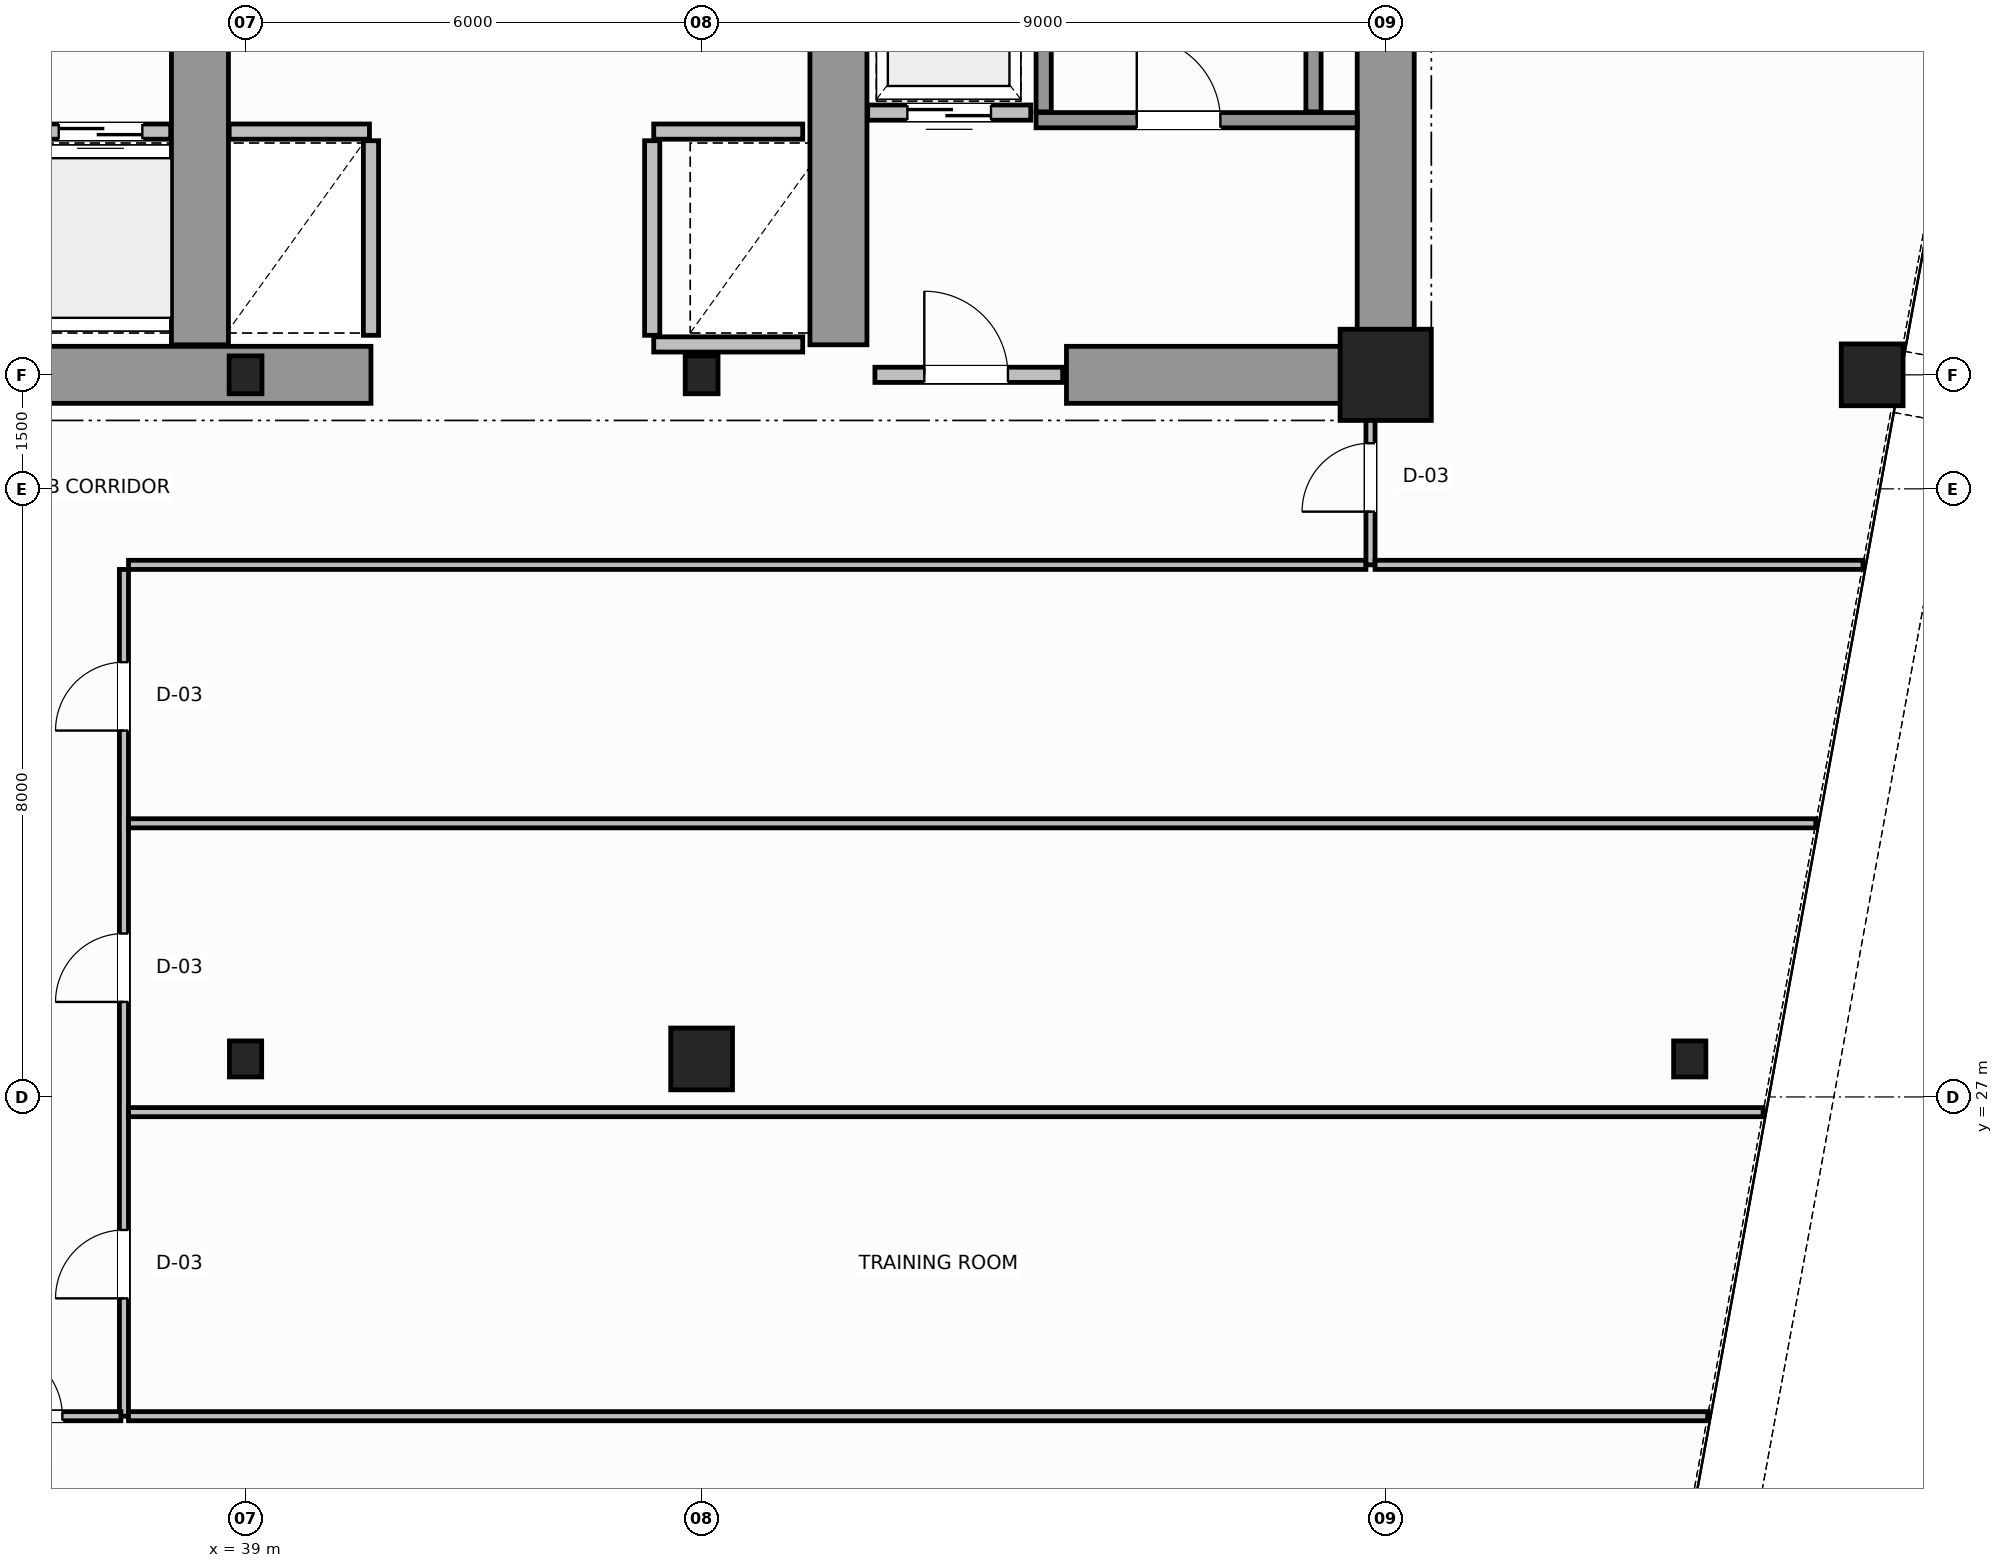
"""IFC4 building model, lengths in metres.
Left out: names, types, materials, properties, quantities, classifications, styles, units other than length and angle.
Written with IfcOpenShell. Run it as: python <this file> out.ifc"""

import sys

from ifc_helpers import new_model, si_unit, direction, frame, frame_2d, origin, origin_2d, place, context, subcontext, project, spatial, rectangle, hollow_circle, i_section, extrude, source, transform, mapped, element, fill, save


model = new_model("IFC4")
c1 = context("Model", 3, precision=1e-05, world=origin(), true_north=direction((0.0, 1.0)))
c2 = subcontext(c1, "Body", "Model", "MODEL_VIEW")
j1 = project(units=[si_unit("LENGTHUNIT", "METRE"), si_unit("PLANEANGLEUNIT", "RADIAN")], contexts=[c1])
p1 = place(None, origin())
s1 = spatial("IfcSite", under=j1, at=p1, CompositionType="ELEMENT")
p2 = place(p1, origin())
s2 = spatial("IfcBuilding", under=s1, at=p2, CompositionType="ELEMENT")
p3 = place(p2, frame((0.0, 0.0, 157.6)))
s3 = spatial("IfcBuildingStorey", under=s2, at=p3, CompositionType="ELEMENT", Elevation=157.6)
m1 = source(origin(), c2, "Body", "SweptSolid", [
    extrude(i_section(OverallWidth=0.432, OverallDepth=0.498, WebThickness=0.055, FlangeThickness=0.068, FilletRadius=0.015, at=origin_2d()), origin(), (0.0, 0.0, 1.0), 3.8),
])
for number, where, z_axis, x_axis in (
    (1, (39.0, 36.5, 0.0), (0.0, 0.0, 1.0), (1.0, 0.0, 0.0)),
    (2, (45.0, 36.5, 0.0), (0.0, 0.0, 1.0), (1.0, 0.0, 0.0)),
):
    element("IfcColumn", number, at=place(p3, frame(where, z_axis=z_axis, x_axis=x_axis)), inside=s3, PredefinedType="COLUMN", context=c2, shape_type="MappedRepresentation", body=[
        mapped(m1, transform((0.0, 0.0, 0.0), scale=1.0)),
    ])
m2 = source(origin(), c2, "Body", "SweptSolid", [
    extrude(rectangle(XDim=1.2, YDim=1.2, at=origin_2d()), origin(), (0.0, 0.0, 1.0), 3.8),
])
p4 = place(p3, frame((54.0, 36.5, 0.0), z_axis=(0.0, 0.0, 1.0), x_axis=(1.0, 0.0, 0.0)))
e3 = element("IfcColumn", 3, at=p4, inside=s3, PredefinedType="COLUMN", context=c2, shape_type="MappedRepresentation", body=[
    mapped(m2, transform((0.0, 0.0, 0.0), scale=1.0)),
])
m3 = source(origin(), c2, "Body", "SweptSolid", [
    extrude(hollow_circle(Radius=0.406, WallThickness=0.04, at=origin_2d()), origin(), (0.0, 0.0, 1.0), 3.8),
])
p5 = place(p3, frame((60.4, 36.5, 0.0), z_axis=(0.0, 0.0, 1.0), x_axis=(1.0, 0.0, 0.0)))
e4 = element("IfcColumn", 4, at=p5, inside=s3, PredefinedType="COLUMN", context=c2, shape_type="MappedRepresentation", body=[
    mapped(m3, transform((0.0, 0.0, 0.0), scale=1.0)),
])
m4 = source(origin(), c2, "Body", "SweptSolid", [
    extrude(i_section(OverallWidth=0.424, OverallDepth=0.474, WebThickness=0.047, FlangeThickness=0.065, FilletRadius=0.015, at=origin_2d()), origin(), (0.0, 0.0, 1.0), 3.8),
])
p6 = place(p3, frame((58.0, 27.5, 0.0), z_axis=(0.0, 0.0, 1.0), x_axis=(1.0, 0.0, 0.0)))
e5 = element("IfcColumn", 5, at=p6, inside=s3, PredefinedType="COLUMN", context=c2, shape_type="MappedRepresentation", body=[
    mapped(m4, transform((0.0, 0.0, 0.0), scale=1.0)),
])
m5 = source(origin(), c2, "Body", "SweptSolid", [
    extrude(i_section(OverallWidth=0.424, OverallDepth=0.474, WebThickness=0.047, FlangeThickness=0.065, FilletRadius=0.015, at=origin_2d()), origin(), (0.0, 0.0, 1.0), 3.8),
])
p7 = place(p3, frame((39.0, 27.5, 0.0), z_axis=(0.0, 0.0, 1.0), x_axis=(1.0, 0.0, 0.0)))
e6 = element("IfcColumn", 6, at=p7, inside=s3, PredefinedType="COLUMN", context=c2, shape_type="MappedRepresentation", body=[
    mapped(m5, transform((0.0, 0.0, 0.0), scale=1.0)),
])
p8 = place(p3, frame((45.0, 27.5, 0.0), z_axis=(0.0, 0.0, 1.0), x_axis=(1.0, 0.0, 0.0)))
e7 = element("IfcColumn", 7, at=p8, inside=s3, PredefinedType="COLUMN", context=c2, shape_type="MappedRepresentation", body=[
    mapped(m3, transform((0.0, 0.0, 0.0), scale=1.0)),
])
p9 = place(p3, frame((54.0, 36.5, 0.0), z_axis=(0.0, 0.0, 1.0), x_axis=(0.0, 1.0, 0.0)))
e8 = element("IfcWall", 8, at=p9, inside=s3, PredefinedType="SHEAR", context=c2, shape_type="SweptSolid", body=[
    extrude(rectangle(XDim=14.5, YDim=0.75, at=frame_2d((7.25, 0.0))), origin(), (0.0, 0.0, 1.0), 3.8),
])
p10 = place(p3, frame((36.15, 36.5, 0.0), z_axis=(0.0, 0.0, 1.0), x_axis=(1.0, 0.0, 0.0)))
e9 = element("IfcWall", 9, at=p10, inside=s3, PredefinedType="SHEAR", context=c2, shape_type="SweptSolid", body=[
    extrude(rectangle(XDim=4.5, YDim=0.75, at=frame_2d((2.25, 0.0))), origin(), (0.0, 0.0, 1.0), 3.8),
])
p11 = place(p3, frame((49.8, 36.5, 0.0), z_axis=(0.0, 0.0, 1.0), x_axis=(1.0, 0.0, 0.0)))
e10 = element("IfcWall", 10, at=p11, inside=s3, PredefinedType="SHEAR", context=c2, shape_type="SweptSolid", body=[
    extrude(rectangle(XDim=3.805, YDim=0.75, at=frame_2d((1.902, 0.0))), origin(), (0.0, 0.0, 1.0), 2.38),
])
for number, where, z_axis, x_axis in (
    (11, (38.4, 36.895, 0.0), (0.0, 0.0, 1.0), (0.0, 1.0, 0.0)),
    (12, (46.8, 36.895, 0.0), (0.0, 0.0, 1.0), (0.0, 1.0, 0.0)),
):
    element("IfcWall", number, at=place(p3, frame(where, z_axis=z_axis, x_axis=x_axis)), inside=s3, PredefinedType="SHEAR", context=c2, shape_type="SweptSolid", body=[
        extrude(rectangle(XDim=9.305, YDim=0.75, at=frame_2d((4.652, 0.0))), origin(), (0.0, 0.0, 1.0), 3.8),
    ])
p12 = place(p3, frame((49.4, 39.85, 0.0), z_axis=(0.0, 0.0, 1.0), x_axis=(1.0, 0.0, 0.0)))
e13 = element("IfcWall", 13, at=p12, inside=s3, PredefinedType="SOLIDWALL", context=c2, shape_type="SweptSolid", body=[
    extrude(rectangle(XDim=4.225, YDim=0.2, at=frame_2d((2.113, 0.0))), origin(), (0.0, 0.0, 1.0), 3.8),
])
p13 = place(p12, frame((1.325, 0.0, 0.0)))
e14 = element("IfcOpeningElement", 14, at=p13, cuts=e13, PredefinedType="OPENING", context=c2, shape_type="SweptSolid", body=[
    extrude(rectangle(XDim=1.1, YDim=2.15, at=frame_2d((0.55, 1.075))), frame((0.0, 0.11, 0.0), z_axis=(0.0, -1.0, 0.0), x_axis=(1.0, 0.0, 0.0)), (0.0, 0.0, 1.0), 0.22),
])
for number, where, z_axis, x_axis in (
    (15, (49.5, 39.96, 0.0), (0.0, 0.0, 1.0), (0.0, 1.0, 0.0)),
    (16, (53.05, 39.96, 0.0), (0.0, 0.0, 1.0), (0.0, 1.0, 0.0)),
):
    element("IfcWall", number, at=place(p3, frame(where, z_axis=z_axis, x_axis=x_axis)), inside=s3, PredefinedType="SOLIDWALL", context=c2, shape_type="SweptSolid", body=[
        extrude(rectangle(XDim=9.93, YDim=0.2, at=frame_2d((4.965, 0.0))), origin(), (0.0, 0.0, 1.0), 3.8),
    ])
p14 = place(p3, frame((47.28, 36.5, 0.0), z_axis=(0.0, 0.0, 1.0), x_axis=(1.0, 0.0, 0.0)))
e17 = element("IfcWall", 17, at=p14, inside=s3, PredefinedType="SOLIDWALL", context=c2, shape_type="SweptSolid", body=[
    extrude(rectangle(XDim=2.47, YDim=0.2, at=frame_2d((1.235, 0.0))), origin(), (0.0, 0.0, 1.0), 2.37),
])
p15 = place(p14, frame((0.65, 0.0, 0.0)))
e18 = element("IfcOpeningElement", 18, at=p15, cuts=e17, PredefinedType="OPENING", context=c2, shape_type="SweptSolid", body=[
    extrude(rectangle(XDim=1.1, YDim=2.15, at=frame_2d((0.55, 1.075))), frame((0.0, 0.11, 0.0), z_axis=(0.0, -1.0, 0.0), x_axis=(1.0, 0.0, 0.0)), (0.0, 0.0, 1.0), 0.22),
])
p16 = place(p3, frame((36.17, 39.7, 0.0), z_axis=(0.0, 0.0, 1.0), x_axis=(1.0, 0.0, 0.0)))
e19 = element("IfcWall", 19, at=p16, inside=s3, PredefinedType="SOLIDWALL", context=c2, shape_type="SweptSolid", body=[
    extrude(rectangle(XDim=1.845, YDim=0.2, at=frame_2d((0.922, 0.0))), origin(), (0.0, 0.0, 1.0), 3.58),
])
p17 = place(p16, frame((0.372, 0.0, 0.0)))
e20 = element("IfcOpeningElement", 20, at=p17, cuts=e19, PredefinedType="OPENING", context=c2, shape_type="SweptSolid", body=[
    extrude(rectangle(XDim=1.1, YDim=2.15, at=frame_2d((0.55, 1.075))), frame((0.0, 0.11, 0.0), z_axis=(0.0, -1.0, 0.0), x_axis=(1.0, 0.0, 0.0)), (0.0, 0.0, 1.0), 0.22),
])
p18 = place(p3, frame((38.785, 39.7, 0.0), z_axis=(0.0, 0.0, 1.0), x_axis=(1.0, 0.0, 0.0)))
e21 = element("IfcWall", 21, at=p18, inside=s3, PredefinedType="SOLIDWALL", context=c2, shape_type="SweptSolid", body=[
    extrude(rectangle(XDim=1.845, YDim=0.2, at=frame_2d((0.922, 0.0))), origin(), (0.0, 0.0, 1.0), 3.58),
])
p19 = place(p3, frame((40.65, 37.02, 0.0), z_axis=(0.0, 0.0, 1.0), x_axis=(0.0, 1.0, 0.0)))
e22 = element("IfcWall", 22, at=p19, inside=s3, PredefinedType="SOLIDWALL", context=c2, shape_type="SweptSolid", body=[
    extrude(rectangle(XDim=2.56, YDim=0.2, at=frame_2d((1.28, 0.0))), origin(), (0.0, 0.0, 1.0), 3.58),
])
p20 = place(p3, frame((44.37, 39.7, 0.0), z_axis=(0.0, 0.0, 1.0), x_axis=(1.0, 0.0, 0.0)))
e23 = element("IfcWall", 23, at=p20, inside=s3, PredefinedType="SOLIDWALL", context=c2, shape_type="SweptSolid", body=[
    extrude(rectangle(XDim=1.96, YDim=0.2, at=frame_2d((0.98, 0.0))), origin(), (0.0, 0.0, 1.0), 3.58),
])
p21 = place(p3, frame((44.37, 36.9, 0.0), z_axis=(0.0, 0.0, 1.0), x_axis=(1.0, 0.0, 0.0)))
e24 = element("IfcWall", 24, at=p21, inside=s3, PredefinedType="SOLIDWALL", context=c2, shape_type="SweptSolid", body=[
    extrude(rectangle(XDim=1.96, YDim=0.2, at=frame_2d((0.98, 0.0))), origin(), (0.0, 0.0, 1.0), 2.37),
])
p22 = place(p3, frame((44.35, 37.02, 0.0), z_axis=(0.0, 0.0, 1.0), x_axis=(0.0, 1.0, 0.0)))
e25 = element("IfcWall", 25, at=p22, inside=s3, PredefinedType="SOLIDWALL", context=c2, shape_type="SweptSolid", body=[
    extrude(rectangle(XDim=2.56, YDim=0.2, at=frame_2d((1.28, 0.0))), origin(), (0.0, 0.0, 1.0), 3.58),
])
p23 = place(p3, frame((47.185, 39.95, 0.0), z_axis=(0.0, 0.0, 1.0), x_axis=(1.0, 0.0, 0.0)))
e26 = element("IfcWall", 26, at=p23, inside=s3, PredefinedType="SOLIDWALL", context=c2, shape_type="SweptSolid", body=[
    extrude(rectangle(XDim=2.145, YDim=0.2, at=frame_2d((1.073, 0.0))), origin(), (0.0, 0.0, 1.0), 3.58),
])
p24 = place(p23, frame((0.522, 0.0, 0.0)))
e27 = element("IfcOpeningElement", 27, at=p24, cuts=e26, PredefinedType="OPENING", context=c2, shape_type="SweptSolid", body=[
    extrude(rectangle(XDim=1.1, YDim=2.15, at=frame_2d((0.55, 1.075))), frame((0.0, 0.11, 0.0), z_axis=(0.0, -1.0, 0.0), x_axis=(1.0, 0.0, 0.0)), (0.0, 0.0, 1.0), 0.22),
])
p25 = place(p3, frame((37.46, 34.0, 0.0), z_axis=(0.0, 0.0, 1.0), x_axis=(1.0, 0.0, 0.0)))
e28 = element("IfcWall", 28, at=p25, inside=s3, PredefinedType="PARTITIONING", context=c2, shape_type="SweptSolid", body=[
    extrude(rectangle(XDim=16.28, YDim=0.12, at=frame_2d((8.14, 0.0))), origin(), (0.0, 0.0, 1.0), 3.58),
])
p26 = place(p3, frame((53.8, 34.0, 0.0), z_axis=(0.0, 0.0, 1.0), x_axis=(0.0, 1.0, 0.0)))
e29 = element("IfcWall", 29, at=p26, inside=s3, PredefinedType="PARTITIONING", context=c2, shape_type="SweptSolid", body=[
    extrude(rectangle(XDim=2.44, YDim=0.12, at=frame_2d((1.22, 0.0))), origin(), (0.0, 0.0, 1.0), 3.58),
])
p27 = place(p26, frame((0.7, 0.0, 0.0)))
e30 = element("IfcOpeningElement", 30, at=p27, cuts=e29, PredefinedType="OPENING", context=c2, shape_type="SweptSolid", body=[
    extrude(rectangle(XDim=0.9, YDim=2.15, at=frame_2d((0.45, 1.075))), frame((0.0, 0.07, 0.0), z_axis=(0.0, -1.0, 0.0), x_axis=(1.0, 0.0, 0.0)), (0.0, 0.0, 1.0), 0.14),
])
p28 = place(p3, frame((37.4, 22.8, 0.0), z_axis=(0.0, 0.0, 1.0), x_axis=(0.0, 1.0, 0.0)))
e31 = element("IfcWall", 31, at=p28, inside=s3, PredefinedType="PARTITIONING", context=c2, shape_type="SweptSolid", body=[
    extrude(rectangle(XDim=11.14, YDim=0.12, at=frame_2d((5.57, 0.0))), origin(), (0.0, 0.0, 1.0), 3.58),
])
p29 = place(p28, frame((1.55, 0.0, 0.0)))
e32 = element("IfcOpeningElement", 32, at=p29, cuts=e31, PredefinedType="OPENING", context=c2, shape_type="SweptSolid", body=[
    extrude(rectangle(XDim=0.9, YDim=2.15, at=frame_2d((0.45, 1.075))), frame((0.0, 0.07, 0.0), z_axis=(0.0, -1.0, 0.0), x_axis=(1.0, 0.0, 0.0)), (0.0, 0.0, 1.0), 0.14),
])
p30 = place(p28, frame((5.45, 0.0, 0.0)))
e33 = element("IfcOpeningElement", 33, at=p30, cuts=e31, PredefinedType="OPENING", context=c2, shape_type="SweptSolid", body=[
    extrude(rectangle(XDim=0.9, YDim=2.15, at=frame_2d((0.45, 1.075))), frame((0.0, 0.07, 0.0), z_axis=(0.0, -1.0, 0.0), x_axis=(1.0, 0.0, 0.0)), (0.0, 0.0, 1.0), 0.14),
])
p31 = place(p28, frame((9.02, 0.0, 0.0)))
e34 = element("IfcOpeningElement", 34, at=p31, cuts=e31, PredefinedType="OPENING", context=c2, shape_type="SweptSolid", body=[
    extrude(rectangle(XDim=0.9, YDim=2.15, at=frame_2d((0.45, 1.075))), frame((0.0, 0.07, 0.0), z_axis=(0.0, -1.0, 0.0), x_axis=(1.0, 0.0, 0.0)), (0.0, 0.0, 1.0), 0.14),
])
p32 = place(p3, frame((35.04, 22.8, 0.0), z_axis=(0.0, 0.0, 1.0), x_axis=(1.0, 0.0, 0.0)))
e35 = element("IfcWall", 35, at=p32, inside=s3, PredefinedType="PARTITIONING", context=c2, shape_type="SweptSolid", body=[
    extrude(rectangle(XDim=2.32, YDim=0.12, at=frame_2d((1.16, 0.0))), origin(), (0.0, 0.0, 1.0), 3.58),
])
p33 = place(p32, frame((0.65, 0.0, 0.0)))
e36 = element("IfcOpeningElement", 36, at=p33, cuts=e35, PredefinedType="OPENING", context=c2, shape_type="SweptSolid", body=[
    extrude(rectangle(XDim=0.9, YDim=2.15, at=frame_2d((0.45, 1.075))), frame((0.0, 0.07, 0.0), z_axis=(0.0, -1.0, 0.0), x_axis=(1.0, 0.0, 0.0)), (0.0, 0.0, 1.0), 0.14),
])
p34 = place(p3, frame((53.86, 34.0, 0.0), z_axis=(0.0, 0.0, 1.0), x_axis=(1.0, 0.0, 0.0)))
e37 = element("IfcWall", 37, at=p34, inside=s3, PredefinedType="PARTITIONING", context=c2, shape_type="SweptSolid", body=[
    extrude(rectangle(XDim=6.418, YDim=0.12, at=frame_2d((3.209, 0.0))), origin(), (0.0, 0.0, 1.0), 3.58),
])
p35 = place(p3, frame((37.46, 26.8, 0.0), z_axis=(0.0, 0.0, 1.0), x_axis=(1.0, 0.0, 0.0)))
e38 = element("IfcWall", 38, at=p35, inside=s3, PredefinedType="PARTITIONING", context=c2, shape_type="SweptSolid", body=[
    extrude(rectangle(XDim=21.505, YDim=0.12, at=frame_2d((10.753, 0.0))), origin(), (0.0, 0.0, 1.0), 3.58),
])
p36 = place(p3, frame((37.46, 30.6, 0.0), z_axis=(0.0, 0.0, 1.0), x_axis=(1.0, 0.0, 0.0)))
e39 = element("IfcWall", 39, at=p36, inside=s3, PredefinedType="PARTITIONING", context=c2, shape_type="SweptSolid", body=[
    extrude(rectangle(XDim=22.198, YDim=0.12, at=frame_2d((11.099, 0.0))), origin(), (0.0, 0.0, 1.0), 3.12),
])
p37 = place(p3, frame((37.46, 22.8, 0.0), z_axis=(0.0, 0.0, 1.0), x_axis=(1.0, 0.0, 0.0)))
e40 = element("IfcWall", 40, at=p37, inside=s3, PredefinedType="PARTITIONING", context=c2, shape_type="SweptSolid", body=[
    extrude(rectangle(XDim=20.776, YDim=0.12, at=frame_2d((10.388, 0.0))), origin(), (0.0, 0.0, 1.0), 3.58),
])
m6 = source(origin(), c2, "Body", "SweptSolid", [
    extrude(rectangle(XDim=1.1, YDim=2.15, at=frame_2d((0.55, 1.075))), frame((0.0, 0.025, 0.0), z_axis=(0.0, -1.0, 0.0), x_axis=(1.0, 0.0, 0.0)), (0.0, 0.0, 1.0), 0.05),
])
p38 = place(p13, origin())
e41 = element("IfcDoor", 41, at=p38, inside=s3, OperationType="SINGLE_SWING_RIGHT", PredefinedType="DOOR", context=c2, shape_type="MappedRepresentation", body=[
    mapped(m6, transform((0.0, 0.0, 0.0), scale=1.0)),
])
fill(e14, e41)
p39 = place(p15, origin())
e42 = element("IfcDoor", 42, at=p39, inside=s3, OperationType="SINGLE_SWING_LEFT", PredefinedType="DOOR", context=c2, shape_type="MappedRepresentation", body=[
    mapped(m6, transform((0.0, 0.0, 0.0), scale=1.0)),
])
fill(e18, e42)
p40 = place(p17, origin())
e43 = element("IfcDoor", 43, at=p40, inside=s3, OperationType="DOUBLE_DOOR_SLIDING", PredefinedType="DOOR", context=c2, shape_type="MappedRepresentation", body=[
    mapped(m6, transform((0.0, 0.0, 0.0), scale=1.0)),
])
fill(e20, e43)
p41 = place(p24, origin())
e44 = element("IfcDoor", 44, at=p41, inside=s3, OperationType="DOUBLE_DOOR_SLIDING", PredefinedType="DOOR", context=c2, shape_type="MappedRepresentation", body=[
    mapped(m6, transform((0.0, 0.0, 0.0), scale=1.0)),
])
fill(e27, e44)
m7 = source(origin(), c2, "Body", "SweptSolid", [
    extrude(rectangle(XDim=0.9, YDim=2.15, at=frame_2d((0.45, 1.075))), frame((0.0, 0.025, 0.0), z_axis=(0.0, -1.0, 0.0), x_axis=(1.0, 0.0, 0.0)), (0.0, 0.0, 1.0), 0.05),
])
p42 = place(p27, origin())
e45 = element("IfcDoor", 45, at=p42, inside=s3, OperationType="SINGLE_SWING_RIGHT", PredefinedType="DOOR", context=c2, shape_type="MappedRepresentation", body=[
    mapped(m7, transform((0.0, 0.0, 0.0), scale=1.0)),
])
fill(e30, e45)
p43 = place(p29, origin())
e46 = element("IfcDoor", 46, at=p43, inside=s3, OperationType="SINGLE_SWING_RIGHT", PredefinedType="DOOR", context=c2, shape_type="MappedRepresentation", body=[
    mapped(m7, transform((0.0, 0.0, 0.0), scale=1.0)),
])
fill(e32, e46)
p44 = place(p30, origin())
e47 = element("IfcDoor", 47, at=p44, inside=s3, OperationType="SINGLE_SWING_LEFT", PredefinedType="DOOR", context=c2, shape_type="MappedRepresentation", body=[
    mapped(m7, transform((0.0, 0.0, 0.0), scale=1.0)),
])
fill(e33, e47)
p45 = place(p31, origin())
e48 = element("IfcDoor", 48, at=p45, inside=s3, OperationType="SINGLE_SWING_RIGHT", PredefinedType="DOOR", context=c2, shape_type="MappedRepresentation", body=[
    mapped(m7, transform((0.0, 0.0, 0.0), scale=1.0)),
])
fill(e34, e48)
p46 = place(p33, origin())
e49 = element("IfcDoor", 49, at=p46, inside=s3, OperationType="SINGLE_SWING_LEFT", PredefinedType="DOOR", context=c2, shape_type="MappedRepresentation", body=[
    mapped(m7, transform((0.0, 0.0, 0.0), scale=1.0)),
])
fill(e36, e49)
save(model, sys.argv[1])
